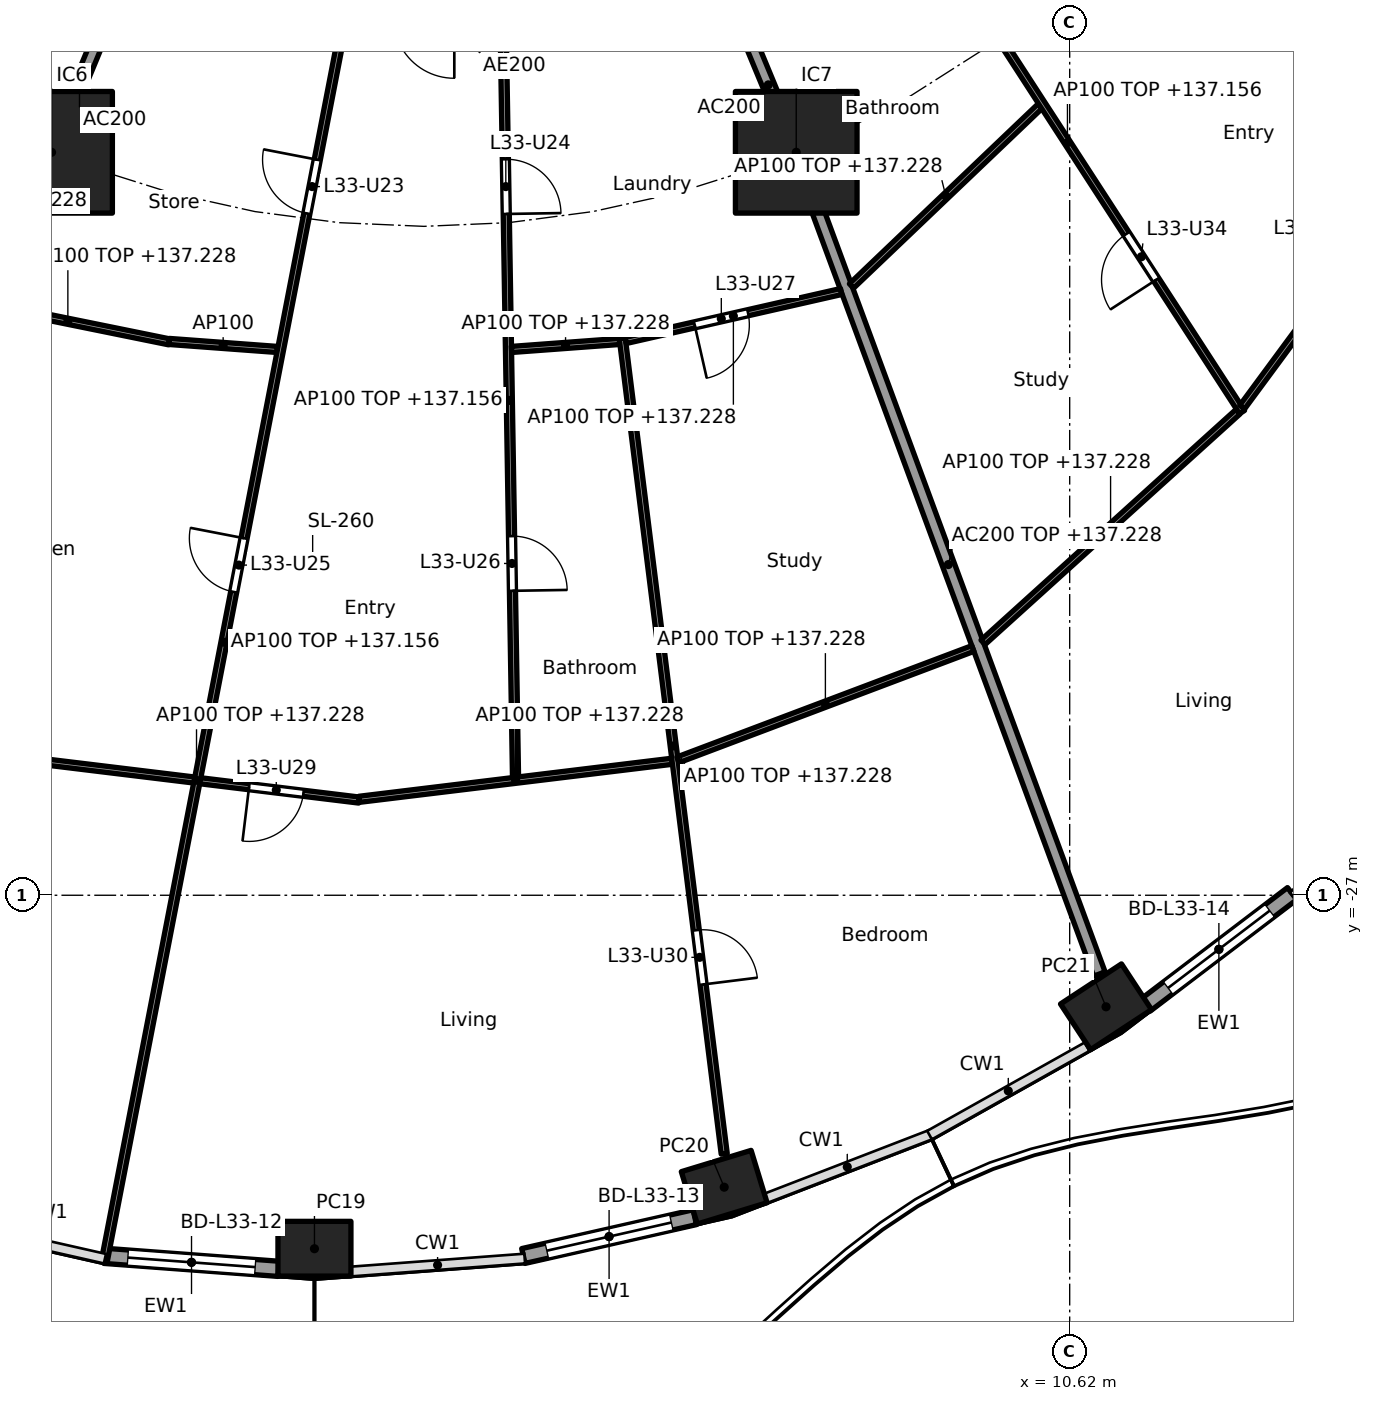
"""IFC4 building model, lengths in metres.
Left out: names, types, materials, properties, quantities, classifications, styles, units other than length and angle.
Written with IfcOpenShell. Run it as: python <this file> out.ifc"""

import sys

from ifc_helpers import new_model, si_unit, direction, frame, frame_2d, origin, origin_2d, place, context, subcontext, project, spatial, rectangle, hollow_rectangle, extrude, element, fill, save


model = new_model("IFC4")
c1 = context("Model", 3, precision=1e-05, world=origin(), true_north=direction((0.0, 1.0)))
c2 = subcontext(c1, "Body", "Model", "MODEL_VIEW")
j1 = project(units=[si_unit("LENGTHUNIT", "METRE"), si_unit("PLANEANGLEUNIT", "RADIAN")], contexts=[c1])
p1 = place(None, origin())
s1 = spatial("IfcSite", under=j1, at=p1, CompositionType="ELEMENT")
p2 = place(p1, origin())
s2 = spatial("IfcBuilding", under=s1, at=p2, CompositionType="ELEMENT")
p3 = place(p2, frame((0.0, 0.0, 134.4)))
s3 = spatial("IfcBuildingStorey", under=s2, at=p3, CompositionType="ELEMENT", Elevation=134.4)
for number, where, z_axis, x_axis in (
    (1, (-1.8, -32.813, 0.0), (0.0, 0.0, 1.0), (1.0, 0.0, 0.0)),
    (2, (4.938, -31.801, 0.0), (0.0, 0.0, 1.0), (0.957, 0.292, 0.0)),
    (3, (11.218, -28.834, 0.0), (0.0, 0.0, 1.0), (0.836, 0.549, 0.0)),
):
    element("IfcColumn", number, at=place(p3, frame(where, z_axis=z_axis, x_axis=x_axis)), inside=s3, PredefinedType="COLUMN", context=c2, shape_type="SweptSolid", body=[
        extrude(hollow_rectangle(XDim=1.2, YDim=0.9, WallThickness=0.04, at=origin_2d()), origin(), (0.0, 0.0, 1.0), 3.7),
    ])
for number, where, z_axis, x_axis in (
    (4, (-6.123, -14.782, 0.0), (0.0, 0.0, 1.0), (1.0, 0.0, 0.0)),
    (5, (6.123, -14.782, 0.0), (0.0, 0.0, 1.0), (1.0, 0.0, 0.0)),
):
    element("IfcColumn", number, at=place(p3, frame(where, z_axis=z_axis, x_axis=x_axis)), inside=s3, PredefinedType="COLUMN", context=c2, shape_type="SweptSolid", body=[
        extrude(rectangle(XDim=2.0, YDim=2.0, at=origin_2d()), origin(), (0.0, 0.0, 1.0), 3.7),
    ])
p4 = place(p3, frame((-2.389, -33.143, 0.0), z_axis=(0.0, 0.0, 1.0), x_axis=(-0.997231697044, 0.074356858535, 0.0)))
e6 = element("IfcWall", 6, at=p4, inside=s3, PredefinedType="SOLIDWALL", context=c2, shape_type="SweptSolid", body=[
    extrude(rectangle(XDim=2.873, YDim=0.25, at=frame_2d((1.437, 0.0))), origin(), (0.0, 0.0, 1.0), 3.44),
])
p5 = place(p4, frame((0.386, 0.0, 0.0)))
e7 = element("IfcOpeningElement", 7, at=p5, cuts=e6, PredefinedType="OPENING", context=c2, shape_type="SweptSolid", body=[
    extrude(rectangle(XDim=2.1, YDim=2.4, at=frame_2d((1.05, 1.2))), frame((0.0, 0.135, 0.0), z_axis=(0.0, -1.0, 0.0), x_axis=(1.0, 0.0, 0.0)), (0.0, 0.0, 1.0), 0.27),
])
p6 = place(p3, frame((4.455, -32.294, 0.0), z_axis=(0.0, 0.0, 1.0), x_axis=(-0.975339035722, -0.220711951186, 0.0)))
e8 = element("IfcWall", 8, at=p6, inside=s3, PredefinedType="SOLIDWALL", context=c2, shape_type="SweptSolid", body=[
    extrude(rectangle(XDim=2.89, YDim=0.25, at=frame_2d((1.445, 0.0))), origin(), (0.0, 0.0, 1.0), 3.44),
])
p7 = place(p6, frame((0.395, 0.0, 0.0)))
e9 = element("IfcOpeningElement", 9, at=p7, cuts=e8, PredefinedType="OPENING", context=c2, shape_type="SweptSolid", body=[
    extrude(rectangle(XDim=2.1, YDim=2.4, at=frame_2d((1.05, 1.2))), frame((0.0, 0.135, 0.0), z_axis=(0.0, -1.0, 0.0), x_axis=(1.0, 0.0, 0.0)), (0.0, 0.0, 1.0), 0.27),
])
p8 = place(p3, frame((14.278, -26.973, 0.0), z_axis=(0.0, 0.0, 1.0), x_axis=(-0.796022231079, -0.605267385233, 0.0)))
e10 = element("IfcWall", 10, at=p8, inside=s3, PredefinedType="SOLIDWALL", context=c2, shape_type="SweptSolid", body=[
    extrude(rectangle(XDim=3.026, YDim=0.25, at=frame_2d((1.513, 0.0))), origin(), (0.0, 0.0, 1.0), 3.44),
])
p9 = place(p8, frame((0.463, 0.0, 0.0)))
e11 = element("IfcOpeningElement", 11, at=p9, cuts=e10, PredefinedType="OPENING", context=c2, shape_type="SweptSolid", body=[
    extrude(rectangle(XDim=2.1, YDim=2.4, at=frame_2d((1.05, 1.2))), frame((0.0, 0.135, 0.0), z_axis=(0.0, -1.0, 0.0), x_axis=(1.0, 0.0, 0.0)), (0.0, 0.0, 1.0), 0.27),
])
p10 = place(p3, frame((-5.243, -12.657, 0.0), z_axis=(0.0, 0.0, 1.0), x_axis=(-0.382818775282, -0.923823460025, 0.0)))
e12 = element("IfcWall", 12, at=p10, inside=s3, PredefinedType="PARTITIONING", context=c2, shape_type="SweptSolid", body=[
    extrude(rectangle(XDim=2.201, YDim=0.2, at=frame_2d((1.101, 0.0))), origin(), (0.0, 0.0, 1.0), 3.44),
])
p11 = place(p3, frame((-6.149, -14.825, 0.0), z_axis=(0.0, 0.0, 1.0), x_axis=(-0.525406383516, -0.85085141603, 0.0)))
e13 = element("IfcWall", 13, at=p11, inside=s3, PredefinedType="PARTITIONING", context=c2, shape_type="SweptSolid", body=[
    extrude(rectangle(XDim=15.925, YDim=0.2, at=frame_2d((7.962, 0.0))), origin(), (0.0, 0.0, 1.0), 2.828),
])
p12 = place(p3, frame((5.243, -12.657, 0.0), z_axis=(0.0, 0.0, 1.0), x_axis=(0.38273085373, -0.923859888513, 0.0)))
e14 = element("IfcWall", 14, at=p12, inside=s3, PredefinedType="PARTITIONING", context=c2, shape_type="SweptSolid", body=[
    extrude(rectangle(XDim=2.199, YDim=0.2, at=frame_2d((1.1, 0.0))), origin(), (0.0, 0.0, 1.0), 3.44),
])
p13 = place(p3, frame((6.14, -14.829, 0.0), z_axis=(0.0, 0.0, 1.0), x_axis=(0.346169582481, -0.938171956608, 0.0)))
e15 = element("IfcWall", 15, at=p13, inside=s3, PredefinedType="PARTITIONING", context=c2, shape_type="SweptSolid", body=[
    extrude(rectangle(XDim=14.354, YDim=0.2, at=frame_2d((7.177, 0.0))), origin(), (0.0, 0.0, 1.0), 2.828),
])
p14 = place(p3, frame((-7.52, -17.222, 0.0), z_axis=(0.0, 0.0, 1.0), x_axis=(0.979964966792, -0.199169937141, 0.0)))
e16 = element("IfcWall", 16, at=p14, inside=s3, PredefinedType="PARTITIONING", context=c2, shape_type="SweptSolid", body=[
    extrude(rectangle(XDim=3.397, YDim=0.1, at=frame_2d((1.698, 0.0))), origin(), (0.0, 0.0, 1.0), 2.828),
])
p15 = place(p3, frame((-4.19, -17.893, 0.0), z_axis=(0.0, 0.0, 1.0), x_axis=(0.99727037024, -0.07383636395, 0.0)))
e17 = element("IfcWall", 17, at=p15, inside=s3, PredefinedType="PARTITIONING", context=c2, shape_type="SweptSolid", body=[
    extrude(rectangle(XDim=1.782, YDim=0.1, at=frame_2d((0.891, 0.0))), origin(), (0.0, 0.0, 1.0), 3.44),
])
p16 = place(p3, frame((-6.413, -24.784, 0.0), z_axis=(0.0, 0.0, 1.0), x_axis=(0.99268660964, -0.120719903255, 0.0)))
e18 = element("IfcWall", 18, at=p16, inside=s3, PredefinedType="PARTITIONING", context=c2, shape_type="SweptSolid", body=[
    extrude(rectangle(XDim=5.385, YDim=0.1, at=frame_2d((2.693, 0.0))), origin(), (0.0, 0.0, 1.0), 2.828),
])
p17 = place(p16, frame((3.564, 0.0, 0.0)))
e19 = element("IfcOpeningElement", 19, at=p17, cuts=e18, PredefinedType="OPENING", context=c2, shape_type="SweptSolid", body=[
    extrude(rectangle(XDim=0.9, YDim=2.1, at=frame_2d((0.45, 1.05))), frame((0.0, 0.06, 0.0), z_axis=(0.0, -1.0, 0.0), x_axis=(1.0, 0.0, 0.0)), (0.0, 0.0, 1.0), 0.12),
])
p18 = place(p3, frame((-1.32, -12.663, 0.0), z_axis=(0.0, 0.0, 1.0), x_axis=(-0.189865535907, -0.98181010296, 0.0)))
e20 = element("IfcWall", 20, at=p18, inside=s3, PredefinedType="PARTITIONING", context=c2, shape_type="SweptSolid", body=[
    extrude(rectangle(XDim=20.729, YDim=0.1, at=frame_2d((10.365, 0.0))), origin(), (0.0, 0.0, 1.0), 2.756),
])
p19 = place(p18, frame((2.283, 0.0, 0.0)))
e21 = element("IfcOpeningElement", 21, at=p19, cuts=e20, PredefinedType="OPENING", context=c2, shape_type="SweptSolid", body=[
    extrude(rectangle(XDim=0.9, YDim=2.1, at=frame_2d((0.45, 1.05))), frame((0.0, 0.06, 0.0), z_axis=(0.0, -1.0, 0.0), x_axis=(1.0, 0.0, 0.0)), (0.0, 0.0, 1.0), 0.12),
])
p20 = place(p18, frame((8.622, 0.0, 0.0)))
e22 = element("IfcOpeningElement", 22, at=p20, cuts=e20, PredefinedType="OPENING", context=c2, shape_type="SweptSolid", body=[
    extrude(rectangle(XDim=0.9, YDim=2.1, at=frame_2d((0.45, 1.05))), frame((0.0, 0.06, 0.0), z_axis=(0.0, -1.0, 0.0), x_axis=(1.0, 0.0, 0.0)), (0.0, 0.0, 1.0), 0.12),
])
p21 = place(p3, frame((-1.066, -25.422, 0.0), z_axis=(0.0, 0.0, 1.0), x_axis=(0.992692993044, 0.120667400577, 0.0)))
e23 = element("IfcWall", 23, at=p21, inside=s3, PredefinedType="PARTITIONING", context=c2, shape_type="SweptSolid", body=[
    extrude(rectangle(XDim=5.186, YDim=0.1, at=frame_2d((2.593, 0.0))), origin(), (0.0, 0.0, 1.0), 2.828),
])
p22 = place(p3, frame((1.303, -12.665, 0.0), z_axis=(0.0, 0.0, 1.0), x_axis=(0.016444820401, -0.999864774798, 0.0)))
e24 = element("IfcWall", 24, at=p22, inside=s3, PredefinedType="PARTITIONING", context=c2, shape_type="SweptSolid", body=[
    extrude(rectangle(XDim=12.396, YDim=0.1, at=frame_2d((6.198, 0.0))), origin(), (0.0, 0.0, 1.0), 2.756),
])
p23 = place(p22, frame((2.232, 0.0, 0.0)))
e25 = element("IfcOpeningElement", 25, at=p23, cuts=e24, PredefinedType="OPENING", context=c2, shape_type="SweptSolid", body=[
    extrude(rectangle(XDim=0.9, YDim=2.1, at=frame_2d((0.45, 1.05))), frame((0.0, 0.06, 0.0), z_axis=(0.0, -1.0, 0.0), x_axis=(1.0, 0.0, 0.0)), (0.0, 0.0, 1.0), 0.12),
])
p24 = place(p22, frame((8.43, 0.0, 0.0)))
e26 = element("IfcOpeningElement", 26, at=p24, cuts=e24, PredefinedType="OPENING", context=c2, shape_type="SweptSolid", body=[
    extrude(rectangle(XDim=0.9, YDim=2.1, at=frame_2d((0.45, 1.05))), frame((0.0, 0.06, 0.0), z_axis=(0.0, -1.0, 0.0), x_axis=(1.0, 0.0, 0.0)), (0.0, 0.0, 1.0), 0.12),
])
p25 = place(p3, frame((1.441, -18.024, 0.0), z_axis=(0.0, 0.0, 1.0), x_axis=(0.997269623256, 0.073846452388, 0.0)))
e27 = element("IfcWall", 27, at=p25, inside=s3, PredefinedType="PARTITIONING", context=c2, shape_type="SweptSolid", body=[
    extrude(rectangle(XDim=1.782, YDim=0.1, at=frame_2d((0.891, 0.0))), origin(), (0.0, 0.0, 1.0), 2.828),
])
p26 = place(p3, frame((3.262, -17.839, 0.0), z_axis=(0.0, 0.0, 1.0), x_axis=(0.124074750982, -0.992272873845, 0.0)))
e28 = element("IfcWall", 28, at=p26, inside=s3, PredefinedType="PARTITIONING", context=c2, shape_type="SweptSolid", body=[
    extrude(rectangle(XDim=13.516, YDim=0.1, at=frame_2d((6.758, 0.0))), origin(), (0.0, 0.0, 1.0), 2.828),
])
p27 = place(p26, frame((9.811, 0.0, 0.0)))
e29 = element("IfcOpeningElement", 29, at=p27, cuts=e28, PredefinedType="OPENING", context=c2, shape_type="SweptSolid", body=[
    extrude(rectangle(XDim=0.9, YDim=2.1, at=frame_2d((0.45, 1.05))), frame((0.0, 0.06, 0.0), z_axis=(0.0, -1.0, 0.0), x_axis=(1.0, 0.0, 0.0)), (0.0, 0.0, 1.0), 0.12),
])
p28 = place(p3, frame((3.317, -17.878, 0.0), z_axis=(0.0, 0.0, 1.0), x_axis=(0.975095905288, 0.221783623135, 0.0)))
e30 = element("IfcWall", 30, at=p28, inside=s3, PredefinedType="PARTITIONING", context=c2, shape_type="SweptSolid", body=[
    extrude(rectangle(XDim=3.636, YDim=0.1, at=frame_2d((1.818, 0.0))), origin(), (0.0, 0.0, 1.0), 2.828),
])
p29 = place(p28, frame((1.164, 0.0, 0.0)))
e31 = element("IfcOpeningElement", 31, at=p29, cuts=e30, PredefinedType="OPENING", context=c2, shape_type="SweptSolid", body=[
    extrude(rectangle(XDim=0.9, YDim=2.1, at=frame_2d((0.45, 1.05))), frame((0.0, 0.06, 0.0), z_axis=(0.0, -1.0, 0.0), x_axis=(1.0, 0.0, 0.0)), (0.0, 0.0, 1.0), 0.12),
])
p30 = place(p3, frame((4.178, -24.773, 0.0), z_axis=(0.0, 0.0, 1.0), x_axis=(0.935583811437, 0.353104703702, 0.0)))
e32 = element("IfcWall", 32, at=p30, inside=s3, PredefinedType="PARTITIONING", context=c2, shape_type="SweptSolid", body=[
    extrude(rectangle(XDim=5.184, YDim=0.1, at=frame_2d((2.592, 0.0))), origin(), (0.0, 0.0, 1.0), 2.828),
])
p31 = place(p3, frame((7.032, -16.98, 0.0), z_axis=(0.0, 0.0, 1.0), x_axis=(0.723709759148, 0.690104473622, 0.0)))
e33 = element("IfcWall", 33, at=p31, inside=s3, PredefinedType="PARTITIONING", context=c2, shape_type="SweptSolid", body=[
    extrude(rectangle(XDim=4.286, YDim=0.1, at=frame_2d((2.143, 0.0))), origin(), (0.0, 0.0, 1.0), 2.828),
])
p32 = place(p3, frame((9.195, -22.84, 0.0), z_axis=(0.0, 0.0, 1.0), x_axis=(0.741675855479, 0.670758470241, 0.0)))
e34 = element("IfcWall", 34, at=p32, inside=s3, PredefinedType="PARTITIONING", context=c2, shape_type="SweptSolid", body=[
    extrude(rectangle(XDim=5.656, YDim=0.1, at=frame_2d((2.828, 0.0))), origin(), (0.0, 0.0, 1.0), 2.828),
])
p33 = place(p3, frame((7.712, -10.195, 0.0), z_axis=(0.0, 0.0, 1.0), x_axis=(0.543868615753, -0.839170381269, 0.0)))
e35 = element("IfcWall", 35, at=p33, inside=s3, PredefinedType="PARTITIONING", context=c2, shape_type="SweptSolid", body=[
    extrude(rectangle(XDim=10.558, YDim=0.1, at=frame_2d((5.279, 0.0))), origin(), (0.0, 0.0, 1.0), 2.756),
])
p34 = place(p33, frame((1.81, 0.0, 0.0)))
e36 = element("IfcOpeningElement", 36, at=p34, cuts=e35, PredefinedType="OPENING", context=c2, shape_type="SweptSolid", body=[
    extrude(rectangle(XDim=0.9, YDim=2.1, at=frame_2d((0.45, 1.05))), frame((0.0, 0.06, 0.0), z_axis=(0.0, -1.0, 0.0), x_axis=(1.0, 0.0, 0.0)), (0.0, 0.0, 1.0), 0.12),
])
p35 = place(p33, frame((7.064, 0.0, 0.0)))
e37 = element("IfcOpeningElement", 37, at=p35, cuts=e35, PredefinedType="OPENING", context=c2, shape_type="SweptSolid", body=[
    extrude(rectangle(XDim=0.9, YDim=2.1, at=frame_2d((0.45, 1.05))), frame((0.0, 0.06, 0.0), z_axis=(0.0, -1.0, 0.0), x_axis=(1.0, 0.0, 0.0)), (0.0, 0.0, 1.0), 0.12),
])
p36 = place(p3, frame((13.457, -18.973, 0.0), z_axis=(0.0, 0.0, 1.0), x_axis=(0.593532053206, 0.80481035146, 0.0)))
e38 = element("IfcWall", 38, at=p36, inside=s3, PredefinedType="PARTITIONING", context=c2, shape_type="SweptSolid", body=[
    extrude(rectangle(XDim=5.876, YDim=0.1, at=frame_2d((2.938, 0.0))), origin(), (0.0, 0.0, 1.0), 2.828),
])
p37 = place(p36, frame((2.488, 0.0, 0.0)))
e39 = element("IfcOpeningElement", 39, at=p37, cuts=e38, PredefinedType="OPENING", context=c2, shape_type="SweptSolid", body=[
    extrude(rectangle(XDim=0.9, YDim=2.1, at=frame_2d((0.45, 1.05))), frame((0.0, 0.06, 0.0), z_axis=(0.0, -1.0, 0.0), x_axis=(1.0, 0.0, 0.0)), (0.0, 0.0, 1.0), 0.12),
])
p38 = place(p3, frame((10.184, -7.727, 0.0), z_axis=(0.0, 0.0, 1.0), x_axis=(0.723635100101, -0.690182759783, 0.0)))
e40 = element("IfcWall", 40, at=p38, inside=s3, PredefinedType="PARTITIONING", context=c2, shape_type="SweptSolid", body=[
    extrude(rectangle(XDim=14.173, YDim=0.1, at=frame_2d((7.086, 0.0))), origin(), (0.0, 0.0, 1.0), 2.756),
])
p39 = place(p38, frame((1.565, 0.0, 0.0)))
e41 = element("IfcOpeningElement", 41, at=p39, cuts=e40, PredefinedType="OPENING", context=c2, shape_type="SweptSolid", body=[
    extrude(rectangle(XDim=0.9, YDim=2.1, at=frame_2d((0.45, 1.05))), frame((0.0, 0.06, 0.0), z_axis=(0.0, -1.0, 0.0), x_axis=(1.0, 0.0, 0.0)), (0.0, 0.0, 1.0), 0.12),
])
p40 = place(p38, frame((6.257, 0.0, 0.0)))
e42 = element("IfcOpeningElement", 42, at=p40, cuts=e40, PredefinedType="OPENING", context=c2, shape_type="SweptSolid", body=[
    extrude(rectangle(XDim=0.9, YDim=2.1, at=frame_2d((0.45, 1.05))), frame((0.0, 0.06, 0.0), z_axis=(0.0, -1.0, 0.0), x_axis=(1.0, 0.0, 0.0)), (0.0, 0.0, 1.0), 0.12),
])
p41 = place(p38, frame((11.328, 0.0, 0.0)))
e43 = element("IfcOpeningElement", 43, at=p41, cuts=e40, PredefinedType="OPENING", context=c2, shape_type="SweptSolid", body=[
    extrude(rectangle(XDim=0.9, YDim=2.1, at=frame_2d((0.45, 1.05))), frame((0.0, 0.06, 0.0), z_axis=(0.0, -1.0, 0.0), x_axis=(1.0, 0.0, 0.0)), (0.0, 0.0, 1.0), 0.12),
])
p42 = place(p5, origin())
e44 = element("IfcDoor", 44, at=p42, inside=s3, OperationType="SLIDING_TO_LEFT", PredefinedType="DOOR", context=c2, shape_type="SweptSolid", body=[
    extrude(rectangle(XDim=2.1, YDim=2.4, at=frame_2d((1.05, 1.2))), frame((0.0, 0.025, 0.0), z_axis=(0.0, -1.0, 0.0), x_axis=(1.0, 0.0, 0.0)), (0.0, 0.0, 1.0), 0.05),
])
fill(e7, e44)
p43 = place(p7, origin())
e45 = element("IfcDoor", 45, at=p43, inside=s3, OperationType="SLIDING_TO_LEFT", PredefinedType="DOOR", context=c2, shape_type="SweptSolid", body=[
    extrude(rectangle(XDim=2.1, YDim=2.4, at=frame_2d((1.05, 1.2))), frame((0.0, 0.025, 0.0), z_axis=(0.0, -1.0, 0.0), x_axis=(1.0, 0.0, 0.0)), (0.0, 0.0, 1.0), 0.05),
])
fill(e9, e45)
p44 = place(p9, origin())
e46 = element("IfcDoor", 46, at=p44, inside=s3, OperationType="SLIDING_TO_LEFT", PredefinedType="DOOR", context=c2, shape_type="SweptSolid", body=[
    extrude(rectangle(XDim=2.1, YDim=2.4, at=frame_2d((1.05, 1.2))), frame((0.0, 0.025, 0.0), z_axis=(0.0, -1.0, 0.0), x_axis=(1.0, 0.0, 0.0)), (0.0, 0.0, 1.0), 0.05),
])
fill(e11, e46)
p45 = place(p19, frame((0.9, 0.0, 0.0), x_axis=(-1.0, 0.0, 0.0)))
e47 = element("IfcDoor", 47, at=p45, inside=s3, OperationType="SINGLE_SWING_RIGHT", PredefinedType="DOOR", context=c2, shape_type="SweptSolid", body=[
    extrude(rectangle(XDim=0.9, YDim=2.1, at=frame_2d((0.45, 1.05))), frame((0.0, 0.025, 0.0), z_axis=(0.0, -1.0, 0.0), x_axis=(1.0, 0.0, 0.0)), (0.0, 0.0, 1.0), 0.05),
])
fill(e21, e47)
p46 = place(p23, origin())
e48 = element("IfcDoor", 48, at=p46, inside=s3, OperationType="SINGLE_SWING_RIGHT", PredefinedType="DOOR", context=c2, shape_type="SweptSolid", body=[
    extrude(rectangle(XDim=0.9, YDim=2.1, at=frame_2d((0.45, 1.05))), frame((0.0, 0.025, 0.0), z_axis=(0.0, -1.0, 0.0), x_axis=(1.0, 0.0, 0.0)), (0.0, 0.0, 1.0), 0.05),
])
fill(e25, e48)
p47 = place(p20, frame((0.9, 0.0, 0.0), x_axis=(-1.0, 0.0, 0.0)))
e49 = element("IfcDoor", 49, at=p47, inside=s3, OperationType="SINGLE_SWING_RIGHT", PredefinedType="DOOR", context=c2, shape_type="SweptSolid", body=[
    extrude(rectangle(XDim=0.9, YDim=2.1, at=frame_2d((0.45, 1.05))), frame((0.0, 0.025, 0.0), z_axis=(0.0, -1.0, 0.0), x_axis=(1.0, 0.0, 0.0)), (0.0, 0.0, 1.0), 0.05),
])
fill(e22, e49)
p48 = place(p24, origin())
e50 = element("IfcDoor", 50, at=p48, inside=s3, OperationType="SINGLE_SWING_RIGHT", PredefinedType="DOOR", context=c2, shape_type="SweptSolid", body=[
    extrude(rectangle(XDim=0.9, YDim=2.1, at=frame_2d((0.45, 1.05))), frame((0.0, 0.025, 0.0), z_axis=(0.0, -1.0, 0.0), x_axis=(1.0, 0.0, 0.0)), (0.0, 0.0, 1.0), 0.05),
])
fill(e26, e50)
p49 = place(p29, frame((0.9, 0.0, 0.0), x_axis=(-1.0, 0.0, 0.0)))
e51 = element("IfcDoor", 51, at=p49, inside=s3, OperationType="SINGLE_SWING_RIGHT", PredefinedType="DOOR", context=c2, shape_type="SweptSolid", body=[
    extrude(rectangle(XDim=0.9, YDim=2.1, at=frame_2d((0.45, 1.05))), frame((0.0, 0.025, 0.0), z_axis=(0.0, -1.0, 0.0), x_axis=(1.0, 0.0, 0.0)), (0.0, 0.0, 1.0), 0.05),
])
fill(e31, e51)
p50 = place(p17, frame((0.9, 0.0, 0.0), x_axis=(-1.0, 0.0, 0.0)))
e52 = element("IfcDoor", 52, at=p50, inside=s3, OperationType="SINGLE_SWING_RIGHT", PredefinedType="DOOR", context=c2, shape_type="SweptSolid", body=[
    extrude(rectangle(XDim=0.9, YDim=2.1, at=frame_2d((0.45, 1.05))), frame((0.0, 0.025, 0.0), z_axis=(0.0, -1.0, 0.0), x_axis=(1.0, 0.0, 0.0)), (0.0, 0.0, 1.0), 0.05),
])
fill(e19, e52)
p51 = place(p27, origin())
e53 = element("IfcDoor", 53, at=p51, inside=s3, OperationType="SINGLE_SWING_RIGHT", PredefinedType="DOOR", context=c2, shape_type="SweptSolid", body=[
    extrude(rectangle(XDim=0.9, YDim=2.1, at=frame_2d((0.45, 1.05))), frame((0.0, 0.025, 0.0), z_axis=(0.0, -1.0, 0.0), x_axis=(1.0, 0.0, 0.0)), (0.0, 0.0, 1.0), 0.05),
])
fill(e29, e53)
p52 = place(p35, frame((0.9, 0.0, 0.0), x_axis=(-1.0, 0.0, 0.0)))
e54 = element("IfcDoor", 54, at=p52, inside=s3, OperationType="SINGLE_SWING_LEFT", PredefinedType="DOOR", context=c2, shape_type="SweptSolid", body=[
    extrude(rectangle(XDim=0.9, YDim=2.1, at=frame_2d((0.45, 1.05))), frame((0.0, 0.025, 0.0), z_axis=(0.0, -1.0, 0.0), x_axis=(1.0, 0.0, 0.0)), (0.0, 0.0, 1.0), 0.05),
])
fill(e37, e54)
save(model, sys.argv[1])
